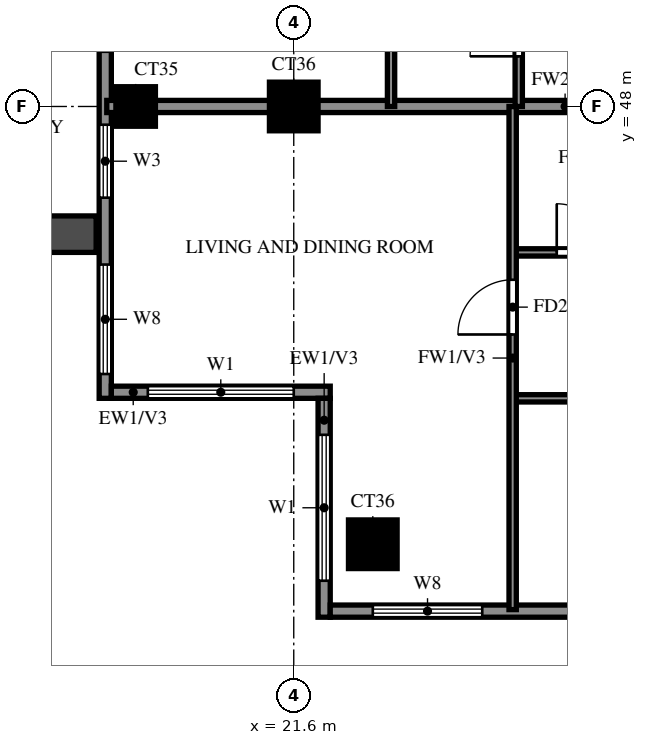
"""IFC4 building model, lengths in metres.
Left out: names, types, materials, properties, quantities, classifications, styles, units other than length and angle.
Written with IfcOpenShell. Run it as: python <this file> out.ifc"""

import sys

from ifc_helpers import new_model, si_unit, direction, frame, frame_2d, origin, origin_2d, place, context, subcontext, project, spatial, rectangle, extrude, source, transform, mapped, element, fill, save


model = new_model("IFC4")
c1 = context("Model", 3, precision=1e-05, world=origin(), true_north=direction((0.0, 1.0)))
c2 = subcontext(c1, "Body", "Model", "MODEL_VIEW")
j1 = project(units=[si_unit("LENGTHUNIT", "METRE"), si_unit("PLANEANGLEUNIT", "RADIAN")], contexts=[c1])
p1 = place(None, origin())
s1 = spatial("IfcSite", under=j1, at=p1, CompositionType="ELEMENT")
p2 = place(p1, origin())
s2 = spatial("IfcBuilding", under=s1, at=p2, CompositionType="ELEMENT")
p3 = place(p2, frame((0.0, 0.0, 250.0)))
s3 = spatial("IfcBuildingStorey", under=s2, at=p3, CompositionType="ELEMENT", Elevation=250.0)
m1 = source(origin(), c2, "Body", "SweptSolid", [
    extrude(rectangle(XDim=0.8, YDim=0.8, at=origin_2d()), origin(), (0.0, 0.0, 1.0), 3.22),
])
p4 = place(p3, frame((22.9, 40.8, 0.0), z_axis=(0.0, 0.0, 1.0), x_axis=(1.0, 0.0, 0.0)))
e1 = element("IfcColumn", 1, at=p4, inside=s3, PredefinedType="COLUMN", context=c2, shape_type="MappedRepresentation", body=[
    mapped(m1, transform((0.0, 0.0, 0.0))),
])
m2 = source(origin(), c2, "Body", "SweptSolid", [
    extrude(rectangle(XDim=0.65, YDim=0.65, at=origin_2d()), origin(), (0.0, 0.0, 1.0), 3.22),
])
p5 = place(p3, frame((19.0, 48.0, 0.0), z_axis=(0.0, 0.0, 1.0), x_axis=(1.0, 0.0, 0.0)))
e2 = element("IfcColumn", 2, at=p5, inside=s3, PredefinedType="COLUMN", context=c2, shape_type="MappedRepresentation", body=[
    mapped(m2, transform((0.0, 0.0, 0.0))),
])
p6 = place(p3, frame((21.6, 48.0, 0.0), z_axis=(0.0, 0.0, 1.0), x_axis=(1.0, 0.0, 0.0)))
e3 = element("IfcColumn", 3, at=p6, inside=s3, PredefinedType="COLUMN", context=c2, shape_type="MappedRepresentation", body=[
    mapped(m1, transform((0.0, 0.0, 0.0))),
])
p7 = place(p3, frame((18.5, 76.6, 0.0), z_axis=(0.0, 0.0, 1.0), x_axis=(0.0, -1.0, 0.0)))
e4 = element("IfcWall", 4, at=p7, inside=s3, PredefinedType="SOLIDWALL", context=c2, shape_type="SweptSolid", body=[
    extrude(rectangle(XDim=33.4, YDim=0.2, at=frame_2d((16.7, 0.0))), origin(), (0.0, 0.0, 1.0), 3.22),
])
p8 = place(p7, frame((11.5, 0.0, 0.0)))
e5 = element("IfcOpeningElement", 5, at=p8, cuts=e4, PredefinedType="OPENING", context=c2, shape_type="SweptSolid", body=[
    extrude(rectangle(XDim=1.8, YDim=2.4, at=frame_2d((0.9, 1.2))), frame((0.0, 0.11, 0.0), z_axis=(0.0, -1.0, 0.0), x_axis=(1.0, 0.0, 0.0)), (0.0, 0.0, 1.0), 0.22),
])
p9 = place(p7, frame((25.9, 0.0, 0.0)))
e6 = element("IfcOpeningElement", 6, at=p9, cuts=e4, PredefinedType="OPENING", context=c2, shape_type="SweptSolid", body=[
    extrude(rectangle(XDim=1.8, YDim=2.4, at=frame_2d((0.9, 1.2))), frame((0.0, 0.11, 0.0), z_axis=(0.0, -1.0, 0.0), x_axis=(1.0, 0.0, 0.0)), (0.0, 0.0, 1.0), 0.22),
])
p10 = place(p7, frame((28.9, 0.0, 0.6)))
e7 = element("IfcOpeningElement", 7, at=p10, cuts=e4, PredefinedType="OPENING", context=c2, shape_type="SweptSolid", body=[
    extrude(rectangle(XDim=1.2, YDim=2.4, at=frame_2d((0.6, 1.2))), frame((0.0, 0.11, 0.0), z_axis=(0.0, -1.0, 0.0), x_axis=(1.0, 0.0, 0.0)), (0.0, 0.0, 1.0), 0.22),
])
p11 = place(p7, frame((31.2, 0.0, 0.6)))
e8 = element("IfcOpeningElement", 8, at=p11, cuts=e4, PredefinedType="OPENING", context=c2, shape_type="SweptSolid", body=[
    extrude(rectangle(XDim=1.8, YDim=2.4, at=frame_2d((0.9, 1.2))), frame((0.0, 0.11, 0.0), z_axis=(0.0, -1.0, 0.0), x_axis=(1.0, 0.0, 0.0)), (0.0, 0.0, 1.0), 0.22),
])
p12 = place(p7, frame((18.233, 0.0, 0.6)))
e9 = element("IfcOpeningElement", 9, at=p12, cuts=e4, PredefinedType="OPENING", context=c2, shape_type="SweptSolid", body=[
    extrude(rectangle(XDim=2.4, YDim=2.4, at=frame_2d((1.2, 1.2))), frame((0.0, 0.11, 0.0), z_axis=(0.0, -1.0, 0.0), x_axis=(1.0, 0.0, 0.0)), (0.0, 0.0, 1.0), 0.22),
])
p13 = place(p7, frame((20.967, 0.0, 0.6)))
e10 = element("IfcOpeningElement", 10, at=p13, cuts=e4, PredefinedType="OPENING", context=c2, shape_type="SweptSolid", body=[
    extrude(rectangle(XDim=2.4, YDim=2.4, at=frame_2d((1.2, 1.2))), frame((0.0, 0.11, 0.0), z_axis=(0.0, -1.0, 0.0), x_axis=(1.0, 0.0, 0.0)), (0.0, 0.0, 1.0), 0.22),
])
p14 = place(p7, frame((14.5, 0.0, 0.6)))
e11 = element("IfcOpeningElement", 11, at=p14, cuts=e4, PredefinedType="OPENING", context=c2, shape_type="SweptSolid", body=[
    extrude(rectangle(XDim=1.2, YDim=2.4, at=frame_2d((0.6, 1.2))), frame((0.0, 0.11, 0.0), z_axis=(0.0, -1.0, 0.0), x_axis=(1.0, 0.0, 0.0)), (0.0, 0.0, 1.0), 0.22),
])
p15 = place(p7, frame((16.75, 0.0, 0.6)))
e12 = element("IfcOpeningElement", 12, at=p15, cuts=e4, PredefinedType="OPENING", context=c2, shape_type="SweptSolid", body=[
    extrude(rectangle(XDim=0.9, YDim=2.4, at=frame_2d((0.45, 1.2))), frame((0.0, 0.11, 0.0), z_axis=(0.0, -1.0, 0.0), x_axis=(1.0, 0.0, 0.0)), (0.0, 0.0, 1.0), 0.22),
])
p16 = place(p7, frame((7.3, 0.0, 0.6)))
e13 = element("IfcOpeningElement", 13, at=p16, cuts=e4, PredefinedType="OPENING", context=c2, shape_type="SweptSolid", body=[
    extrude(rectangle(XDim=1.8, YDim=2.4, at=frame_2d((0.9, 1.2))), frame((0.0, 0.11, 0.0), z_axis=(0.0, -1.0, 0.0), x_axis=(1.0, 0.0, 0.0)), (0.0, 0.0, 1.0), 0.22),
])
p17 = place(p7, frame((4.75, 0.0, 1.5)))
e14 = element("IfcOpeningElement", 14, at=p17, cuts=e4, PredefinedType="OPENING", context=c2, shape_type="SweptSolid", body=[
    extrude(rectangle(XDim=0.9, YDim=0.9, at=frame_2d((0.45, 0.45))), frame((0.0, 0.11, 0.0), z_axis=(0.0, -1.0, 0.0), x_axis=(1.0, 0.0, 0.0)), (0.0, 0.0, 1.0), 0.22),
])
p18 = place(p7, frame((0.6, 0.0, 0.6)))
e15 = element("IfcOpeningElement", 15, at=p18, cuts=e4, PredefinedType="OPENING", context=c2, shape_type="SweptSolid", body=[
    extrude(rectangle(XDim=2.4, YDim=2.4, at=frame_2d((1.2, 1.2))), frame((0.0, 0.11, 0.0), z_axis=(0.0, -1.0, 0.0), x_axis=(1.0, 0.0, 0.0)), (0.0, 0.0, 1.0), 0.22),
])
p19 = place(p3, frame((18.6, 43.3, 0.0), z_axis=(0.0, 0.0, 1.0), x_axis=(1.0, 0.0, 0.0)))
e16 = element("IfcWall", 16, at=p19, inside=s3, PredefinedType="SOLIDWALL", context=c2, shape_type="SweptSolid", body=[
    extrude(rectangle(XDim=3.6, YDim=0.2, at=frame_2d((1.8, 0.0))), origin(), (0.0, 0.0, 1.0), 3.22),
])
p20 = place(p19, frame((0.6, 0.0, 0.6)))
e17 = element("IfcOpeningElement", 17, at=p20, cuts=e16, PredefinedType="OPENING", context=c2, shape_type="SweptSolid", body=[
    extrude(rectangle(XDim=2.4, YDim=2.4, at=frame_2d((1.2, 1.2))), frame((0.0, 0.11, 0.0), z_axis=(0.0, -1.0, 0.0), x_axis=(1.0, 0.0, 0.0)), (0.0, 0.0, 1.0), 0.22),
])
p21 = place(p3, frame((22.1, 43.2, 0.0), z_axis=(0.0, 0.0, 1.0), x_axis=(0.0, -1.0, 0.0)))
e18 = element("IfcWall", 18, at=p21, inside=s3, PredefinedType="SOLIDWALL", context=c2, shape_type="SweptSolid", body=[
    extrude(rectangle(XDim=3.6, YDim=0.2, at=frame_2d((1.8, 0.0))), origin(), (0.0, 0.0, 1.0), 3.22),
])
p22 = place(p21, frame((0.6, 0.0, 0.6)))
e19 = element("IfcOpeningElement", 19, at=p22, cuts=e18, PredefinedType="OPENING", context=c2, shape_type="SweptSolid", body=[
    extrude(rectangle(XDim=2.4, YDim=2.4, at=frame_2d((1.2, 1.2))), frame((0.0, 0.11, 0.0), z_axis=(0.0, -1.0, 0.0), x_axis=(1.0, 0.0, 0.0)), (0.0, 0.0, 1.0), 0.22),
])
p23 = place(p3, frame((22.2, 39.7, 0.0), z_axis=(0.0, 0.0, 1.0), x_axis=(1.0, 0.0, 0.0)))
e20 = element("IfcWall", 20, at=p23, inside=s3, PredefinedType="SOLIDWALL", context=c2, shape_type="SweptSolid", body=[
    extrude(rectangle(XDim=19.8, YDim=0.2, at=frame_2d((9.9, 0.0))), origin(), (0.0, 0.0, 1.0), 3.22),
])
p24 = place(p23, frame((0.7, 0.0, 0.6)))
e21 = element("IfcOpeningElement", 21, at=p24, cuts=e20, PredefinedType="OPENING", context=c2, shape_type="SweptSolid", body=[
    extrude(rectangle(XDim=1.8, YDim=2.4, at=frame_2d((0.9, 1.2))), frame((0.0, 0.11, 0.0), z_axis=(0.0, -1.0, 0.0), x_axis=(1.0, 0.0, 0.0)), (0.0, 0.0, 1.0), 0.22),
])
p25 = place(p23, frame((7.8, 0.0, 0.6)))
e22 = element("IfcOpeningElement", 22, at=p25, cuts=e20, PredefinedType="OPENING", context=c2, shape_type="SweptSolid", body=[
    extrude(rectangle(XDim=2.4, YDim=2.4, at=frame_2d((1.2, 1.2))), frame((0.0, 0.11, 0.0), z_axis=(0.0, -1.0, 0.0), x_axis=(1.0, 0.0, 0.0)), (0.0, 0.0, 1.0), 0.22),
])
p26 = place(p23, frame((4.35, 0.0, 1.5)))
e23 = element("IfcOpeningElement", 23, at=p26, cuts=e20, PredefinedType="OPENING", context=c2, shape_type="SweptSolid", body=[
    extrude(rectangle(XDim=0.9, YDim=0.9, at=frame_2d((0.45, 0.45))), frame((0.0, 0.11, 0.0), z_axis=(0.0, -1.0, 0.0), x_axis=(1.0, 0.0, 0.0)), (0.0, 0.0, 1.0), 0.22),
])
p27 = place(p3, frame((18.35, 45.9, 0.0), z_axis=(0.0, 0.0, 1.0), x_axis=(-1.0, 0.0, 0.0)))
e24 = element("IfcWall", 24, at=p27, inside=s3, PredefinedType="SOLIDWALL", context=c2, shape_type="SweptSolid", body=[
    extrude(rectangle(XDim=2.65, YDim=0.6, at=frame_2d((1.325, 0.0))), origin(), (0.0, 0.0, 1.0), 2.85),
])
p28 = place(p3, frame((18.525, 48.0, 0.0), z_axis=(0.0, 0.0, 1.0), x_axis=(1.0, 0.0, 0.0)))
e25 = element("IfcWall", 25, at=p28, inside=s3, PredefinedType="SOLIDWALL", context=c2, shape_type="SweptSolid", body=[
    extrude(rectangle(XDim=15.075, YDim=0.2, at=frame_2d((7.538, 0.0))), origin(), (0.0, 0.0, 1.0), 3.22),
])
p29 = place(p3, frame((25.2, 43.2, 0.0), z_axis=(0.0, 0.0, 1.0), x_axis=(1.0, 0.0, 0.0)))
e26 = element("IfcWall", 26, at=p29, inside=s3, PredefinedType="PARTITIONING", context=c2, shape_type="SweptSolid", body=[
    extrude(rectangle(XDim=3.6, YDim=0.12, at=frame_2d((1.8, 0.0))), origin(), (0.0, 0.0, 1.0), 3.22),
])
p30 = place(p3, frame((25.2, 45.6, 0.0), z_axis=(0.0, 0.0, 1.0), x_axis=(1.0, 0.0, 0.0)))
e27 = element("IfcWall", 27, at=p30, inside=s3, PredefinedType="PARTITIONING", context=c2, shape_type="SweptSolid", body=[
    extrude(rectangle(XDim=6.0, YDim=0.12, at=frame_2d((3.0, 0.0))), origin(), (0.0, 0.0, 1.0), 3.22),
])
p31 = place(p30, frame((0.725, 0.0, 0.0)))
e28 = element("IfcOpeningElement", 28, at=p31, cuts=e27, PredefinedType="OPENING", context=c2, shape_type="SweptSolid", body=[
    extrude(rectangle(XDim=0.8, YDim=2.1, at=frame_2d((0.4, 1.05))), frame((0.0, 0.07, 0.0), z_axis=(0.0, -1.0, 0.0), x_axis=(1.0, 0.0, 0.0)), (0.0, 0.0, 1.0), 0.14),
])
p32 = place(p30, frame((3.675, 0.0, 0.0)))
e29 = element("IfcOpeningElement", 29, at=p32, cuts=e27, PredefinedType="OPENING", context=c2, shape_type="SweptSolid", body=[
    extrude(rectangle(XDim=0.9, YDim=2.1, at=frame_2d((0.45, 1.05))), frame((0.0, 0.07, 0.0), z_axis=(0.0, -1.0, 0.0), x_axis=(1.0, 0.0, 0.0)), (0.0, 0.0, 1.0), 0.14),
])
p33 = place(p3, frame((23.2, 48.0, 0.0), z_axis=(0.0, 0.0, 1.0), x_axis=(0.0, 1.0, 0.0)))
e30 = element("IfcWall", 30, at=p33, inside=s3, PredefinedType="PARTITIONING", context=c2, shape_type="SweptSolid", body=[
    extrude(rectangle(XDim=21.6, YDim=0.12, at=frame_2d((10.8, 0.0))), origin(), (0.0, 0.0, 1.0), 3.22),
])
p34 = place(p33, frame((1.35, 0.0, 0.0)))
e31 = element("IfcOpeningElement", 31, at=p34, cuts=e30, PredefinedType="OPENING", context=c2, shape_type="SweptSolid", body=[
    extrude(rectangle(XDim=0.9, YDim=2.1, at=frame_2d((0.45, 1.05))), frame((0.0, 0.07, 0.0), z_axis=(0.0, -1.0, 0.0), x_axis=(1.0, 0.0, 0.0)), (0.0, 0.0, 1.0), 0.14),
])
p35 = place(p33, frame((7.95, 0.0, 0.0)))
e32 = element("IfcOpeningElement", 32, at=p35, cuts=e30, PredefinedType="OPENING", context=c2, shape_type="SweptSolid", body=[
    extrude(rectangle(XDim=1.5, YDim=2.1, at=frame_2d((0.75, 1.05))), frame((0.0, 0.07, 0.0), z_axis=(0.0, -1.0, 0.0), x_axis=(1.0, 0.0, 0.0)), (0.0, 0.0, 1.0), 0.14),
])
p36 = place(p33, frame((12.15, 0.0, 0.0)))
e33 = element("IfcOpeningElement", 33, at=p36, cuts=e30, PredefinedType="OPENING", context=c2, shape_type="SweptSolid", body=[
    extrude(rectangle(XDim=0.9, YDim=2.1, at=frame_2d((0.45, 1.05))), frame((0.0, 0.07, 0.0), z_axis=(0.0, -1.0, 0.0), x_axis=(1.0, 0.0, 0.0)), (0.0, 0.0, 1.0), 0.14),
])
p37 = place(p33, frame((15.75, 0.0, 0.0)))
e34 = element("IfcOpeningElement", 34, at=p37, cuts=e30, PredefinedType="OPENING", context=c2, shape_type="SweptSolid", body=[
    extrude(rectangle(XDim=0.9, YDim=2.1, at=frame_2d((0.45, 1.05))), frame((0.0, 0.07, 0.0), z_axis=(0.0, -1.0, 0.0), x_axis=(1.0, 0.0, 0.0)), (0.0, 0.0, 1.0), 0.14),
])
p38 = place(p33, frame((19.35, 0.0, 0.0)))
e35 = element("IfcOpeningElement", 35, at=p38, cuts=e30, PredefinedType="OPENING", context=c2, shape_type="SweptSolid", body=[
    extrude(rectangle(XDim=0.9, YDim=2.1, at=frame_2d((0.45, 1.05))), frame((0.0, 0.07, 0.0), z_axis=(0.0, -1.0, 0.0), x_axis=(1.0, 0.0, 0.0)), (0.0, 0.0, 1.0), 0.14),
])
p39 = place(p3, frame((25.2, 39.725, 0.0), z_axis=(0.0, 0.0, 1.0), x_axis=(0.0, 1.0, 0.0)))
e36 = element("IfcWall", 36, at=p39, inside=s3, PredefinedType="PARTITIONING", context=c2, shape_type="SweptSolid", body=[
    extrude(rectangle(XDim=8.275, YDim=0.12, at=frame_2d((4.137, 0.0))), origin(), (0.0, 0.0, 1.0), 3.22),
])
p40 = place(p39, frame((4.525, 0.0, 0.0)))
e37 = element("IfcOpeningElement", 37, at=p40, cuts=e36, PredefinedType="OPENING", context=c2, shape_type="SweptSolid", body=[
    extrude(rectangle(XDim=0.9, YDim=2.1, at=frame_2d((0.45, 1.05))), frame((0.0, 0.07, 0.0), z_axis=(0.0, -1.0, 0.0), x_axis=(1.0, 0.0, 0.0)), (0.0, 0.0, 1.0), 0.14),
])
p41 = place(p3, frame((25.3, 48.0, 0.0), z_axis=(0.0, 0.0, 1.0), x_axis=(0.0, 1.0, 0.0)))
e38 = element("IfcWall", 38, at=p41, inside=s3, PredefinedType="PARTITIONING", context=c2, shape_type="SweptSolid", body=[
    extrude(rectangle(XDim=5.2, YDim=0.12, at=frame_2d((2.6, 0.0))), origin(), (0.0, 0.0, 1.0), 3.22),
])
p42 = place(p41, frame((0.825, 0.0, 0.0)))
e39 = element("IfcOpeningElement", 39, at=p42, cuts=e38, PredefinedType="OPENING", context=c2, shape_type="SweptSolid", body=[
    extrude(rectangle(XDim=0.8, YDim=2.1, at=frame_2d((0.4, 1.05))), frame((0.0, 0.07, 0.0), z_axis=(0.0, -1.0, 0.0), x_axis=(1.0, 0.0, 0.0)), (0.0, 0.0, 1.0), 0.14),
])
p43 = place(p10, origin())
e40 = element("IfcWindow", 40, at=p43, inside=s3, PartitioningType="SINGLE_PANEL", PredefinedType="WINDOW", context=c2, shape_type="SweptSolid", body=[
    extrude(rectangle(XDim=1.2, YDim=2.4, at=frame_2d((0.6, 1.2))), frame((0.0, 0.03, 0.0), z_axis=(0.0, -1.0, 0.0), x_axis=(1.0, 0.0, 0.0)), (0.0, 0.0, 1.0), 0.06),
])
fill(e7, e40)
p44 = place(p11, origin())
e41 = element("IfcWindow", 41, at=p44, inside=s3, PartitioningType="DOUBLE_PANEL_VERTICAL", PredefinedType="WINDOW", context=c2, shape_type="SweptSolid", body=[
    extrude(rectangle(XDim=1.8, YDim=2.4, at=frame_2d((0.9, 1.2))), frame((0.0, 0.03, 0.0), z_axis=(0.0, -1.0, 0.0), x_axis=(1.0, 0.0, 0.0)), (0.0, 0.0, 1.0), 0.06),
])
fill(e8, e41)
p45 = place(p20, origin())
e42 = element("IfcWindow", 42, at=p45, inside=s3, PartitioningType="DOUBLE_PANEL_VERTICAL", PredefinedType="WINDOW", context=c2, shape_type="SweptSolid", body=[
    extrude(rectangle(XDim=2.4, YDim=2.4, at=frame_2d((1.2, 1.2))), frame((0.0, 0.03, 0.0), z_axis=(0.0, -1.0, 0.0), x_axis=(1.0, 0.0, 0.0)), (0.0, 0.0, 1.0), 0.06),
])
fill(e17, e42)
p46 = place(p22, origin())
e43 = element("IfcWindow", 43, at=p46, inside=s3, PartitioningType="DOUBLE_PANEL_VERTICAL", PredefinedType="WINDOW", context=c2, shape_type="SweptSolid", body=[
    extrude(rectangle(XDim=2.4, YDim=2.4, at=frame_2d((1.2, 1.2))), frame((0.0, 0.03, 0.0), z_axis=(0.0, -1.0, 0.0), x_axis=(1.0, 0.0, 0.0)), (0.0, 0.0, 1.0), 0.06),
])
fill(e19, e43)
p47 = place(p24, origin())
e44 = element("IfcWindow", 44, at=p47, inside=s3, PartitioningType="DOUBLE_PANEL_VERTICAL", PredefinedType="WINDOW", context=c2, shape_type="SweptSolid", body=[
    extrude(rectangle(XDim=1.8, YDim=2.4, at=frame_2d((0.9, 1.2))), frame((0.0, 0.03, 0.0), z_axis=(0.0, -1.0, 0.0), x_axis=(1.0, 0.0, 0.0)), (0.0, 0.0, 1.0), 0.06),
])
fill(e21, e44)
p48 = place(p40, origin())
e45 = element("IfcDoor", 45, at=p48, inside=s3, OperationType="SINGLE_SWING_LEFT", PredefinedType="DOOR", context=c2, shape_type="SweptSolid", body=[
    extrude(rectangle(XDim=0.9, YDim=2.1, at=frame_2d((0.45, 1.05))), frame((0.0, 0.025, 0.0), z_axis=(0.0, -1.0, 0.0), x_axis=(1.0, 0.0, 0.0)), (0.0, 0.0, 1.0), 0.05),
])
fill(e37, e45)
p49 = place(p31, origin())
e46 = element("IfcDoor", 46, at=p49, inside=s3, OperationType="SINGLE_SWING_LEFT", PredefinedType="DOOR", context=c2, shape_type="SweptSolid", body=[
    extrude(rectangle(XDim=0.8, YDim=2.1, at=frame_2d((0.4, 1.05))), frame((0.0, 0.025, 0.0), z_axis=(0.0, -1.0, 0.0), x_axis=(1.0, 0.0, 0.0)), (0.0, 0.0, 1.0), 0.05),
])
fill(e28, e46)
p50 = place(p42, origin())
e47 = element("IfcDoor", 47, at=p50, inside=s3, OperationType="SINGLE_SWING_RIGHT", PredefinedType="DOOR", context=c2, shape_type="SweptSolid", body=[
    extrude(rectangle(XDim=0.8, YDim=2.1, at=frame_2d((0.4, 1.05))), frame((0.0, 0.025, 0.0), z_axis=(0.0, -1.0, 0.0), x_axis=(1.0, 0.0, 0.0)), (0.0, 0.0, 1.0), 0.05),
])
fill(e39, e47)
save(model, sys.argv[1])
